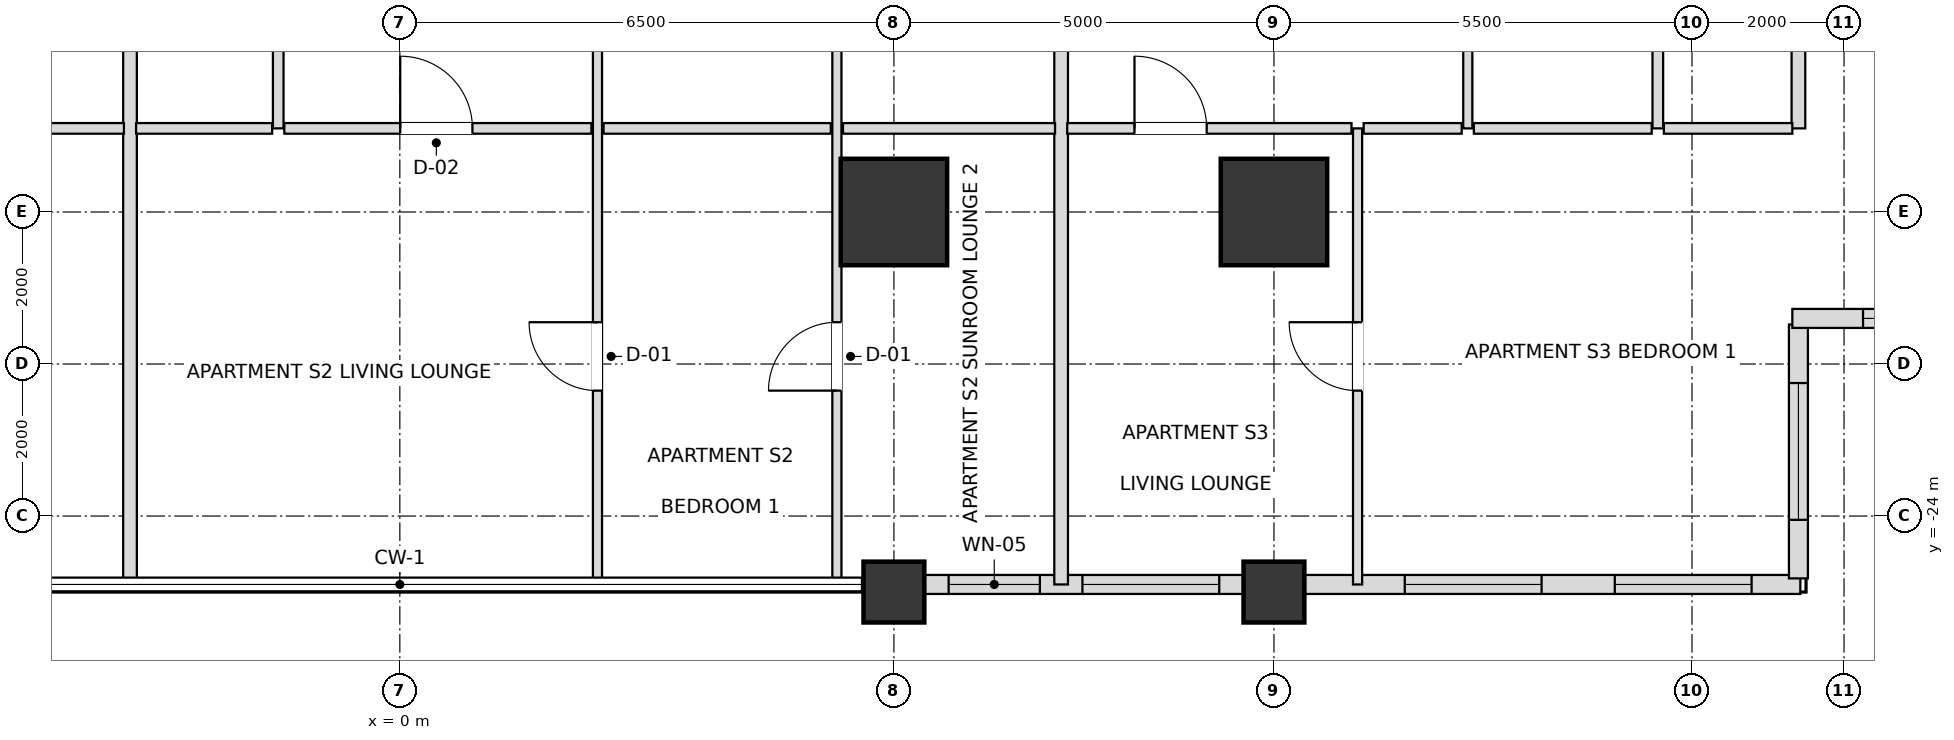
"""IFC4 building model, lengths in metres.
Left out: names, types, materials, properties, quantities, classifications, styles, units other than length and angle.
Written with IfcOpenShell. Run it as: python <this file> out.ifc"""

import sys

from ifc_helpers import new_model, si_unit, direction, frame, frame_2d, origin, origin_2d, place, context, subcontext, project, spatial, rectangle, extrude, element, fill, save


model = new_model("IFC4")
c1 = context("Model", 3, precision=1e-05, world=origin(), true_north=direction((0.0, 1.0)))
c2 = subcontext(c1, "Body", "Model", "MODEL_VIEW")
j1 = project(units=[si_unit("LENGTHUNIT", "METRE"), si_unit("PLANEANGLEUNIT", "RADIAN")], contexts=[c1])
p1 = place(None, origin())
s1 = spatial("IfcSite", under=j1, at=p1, CompositionType="ELEMENT")
p2 = place(p1, origin())
s2 = spatial("IfcBuilding", under=s1, at=p2, CompositionType="ELEMENT")
p3 = place(p2, frame((0.0, 0.0, 43.2)))
s3 = spatial("IfcBuildingStorey", under=s2, at=p3, CompositionType="ELEMENT", Elevation=43.2)
for number, where, z_axis, x_axis in (
    (1, (6.5, -20.0, 0.0), (0.0, 0.0, 1.0), (1.0, 0.0, 0.0)),
    (2, (11.5, -20.0, 0.0), (0.0, 0.0, 1.0), (1.0, 0.0, 0.0)),
):
    element("IfcColumn", number, at=place(p3, frame(where, z_axis=z_axis, x_axis=x_axis)), inside=s3, PredefinedType="USERDEFINED", context=c2, shape_type="SweptSolid", body=[
        extrude(rectangle(XDim=1.4, YDim=1.4, at=origin_2d()), origin(), (0.0, 0.0, 1.0), 3.6),
    ])
for number, where, z_axis, x_axis in (
    (3, (6.5, -25.0, 0.0), (0.0, 0.0, 1.0), (1.0, 0.0, 0.0)),
    (4, (11.5, -25.0, 0.0), (0.0, 0.0, 1.0), (1.0, 0.0, 0.0)),
):
    element("IfcColumn", number, at=place(p3, frame(where, z_axis=z_axis, x_axis=x_axis)), inside=s3, PredefinedType="COLUMN", context=c2, shape_type="SweptSolid", body=[
        extrude(rectangle(XDim=0.8, YDim=0.8, at=origin_2d()), origin(), (0.0, 0.0, 1.0), 3.6),
    ])
p4 = place(p3, frame((6.895, -24.9, 0.0), z_axis=(0.0, 0.0, 1.0), x_axis=(1.0, 0.0, 0.0)))
e5 = element("IfcWall", 5, at=p4, inside=s3, PredefinedType="SOLIDWALL", context=c2, shape_type="SweptSolid", body=[
    extrude(rectangle(XDim=4.21, YDim=0.25, at=frame_2d((2.105, 0.0))), origin(), (0.0, 0.0, 1.0), 2.736),
])
p5 = place(p4, frame((0.325, 0.0, 0.72)))
e6 = element("IfcOpeningElement", 6, at=p5, cuts=e5, PredefinedType="OPENING", context=c2, shape_type="SweptSolid", body=[
    extrude(rectangle(XDim=1.2, YDim=1.68, at=frame_2d((0.6, 0.84))), frame((0.0, 0.135, 0.0), z_axis=(0.0, -1.0, 0.0), x_axis=(1.0, 0.0, 0.0)), (0.0, 0.0, 1.0), 0.27),
])
p6 = place(p4, frame((2.085, 0.0, 0.72)))
e7 = element("IfcOpeningElement", 7, at=p6, cuts=e5, PredefinedType="OPENING", context=c2, shape_type="SweptSolid", body=[
    extrude(rectangle(XDim=1.8, YDim=1.68, at=frame_2d((0.9, 0.84))), frame((0.0, 0.135, 0.0), z_axis=(0.0, -1.0, 0.0), x_axis=(1.0, 0.0, 0.0)), (0.0, 0.0, 1.0), 0.27),
])
p7 = place(p3, frame((11.895, -24.9, 0.0), z_axis=(0.0, 0.0, 1.0), x_axis=(1.0, 0.0, 0.0)))
e8 = element("IfcWall", 8, at=p7, inside=s3, PredefinedType="SOLIDWALL", context=c2, shape_type="SweptSolid", body=[
    extrude(rectangle(XDim=6.53, YDim=0.25, at=frame_2d((3.265, 0.0))), origin(), (0.0, 0.0, 1.0), 2.736),
])
p8 = place(p7, frame((1.326, 0.0, 0.72)))
e9 = element("IfcOpeningElement", 9, at=p8, cuts=e8, PredefinedType="OPENING", context=c2, shape_type="SweptSolid", body=[
    extrude(rectangle(XDim=1.8, YDim=1.68, at=frame_2d((0.9, 0.84))), frame((0.0, 0.135, 0.0), z_axis=(0.0, -1.0, 0.0), x_axis=(1.0, 0.0, 0.0)), (0.0, 0.0, 1.0), 0.27),
])
p9 = place(p7, frame((4.089, 0.0, 0.72)))
e10 = element("IfcOpeningElement", 10, at=p9, cuts=e8, PredefinedType="OPENING", context=c2, shape_type="SweptSolid", body=[
    extrude(rectangle(XDim=1.8, YDim=1.68, at=frame_2d((0.9, 0.84))), frame((0.0, 0.135, 0.0), z_axis=(0.0, -1.0, 0.0), x_axis=(1.0, 0.0, 0.0)), (0.0, 0.0, 1.0), 0.27),
])
p10 = place(p3, frame((18.4, -24.82, 0.0), z_axis=(0.0, 0.0, 1.0), x_axis=(0.0, 1.0, 0.0)))
e11 = element("IfcWall", 11, at=p10, inside=s3, PredefinedType="SOLIDWALL", context=c2, shape_type="SweptSolid", body=[
    extrude(rectangle(XDim=3.34, YDim=0.25, at=frame_2d((1.67, 0.0))), origin(), (0.0, 0.0, 1.0), 2.736),
])
p11 = place(p10, frame((0.77, 0.0, 0.72)))
e12 = element("IfcOpeningElement", 12, at=p11, cuts=e11, PredefinedType="OPENING", context=c2, shape_type="SweptSolid", body=[
    extrude(rectangle(XDim=1.8, YDim=1.68, at=frame_2d((0.9, 0.84))), frame((0.0, 0.135, 0.0), z_axis=(0.0, -1.0, 0.0), x_axis=(1.0, 0.0, 0.0)), (0.0, 0.0, 1.0), 0.27),
])
p12 = place(p3, frame((18.32, -21.4, 0.0), z_axis=(0.0, 0.0, 1.0), x_axis=(1.0, 0.0, 0.0)))
e13 = element("IfcWall", 13, at=p12, inside=s3, PredefinedType="SOLIDWALL", context=c2, shape_type="SweptSolid", body=[
    extrude(rectangle(XDim=3.66, YDim=0.25, at=frame_2d((1.83, 0.0))), origin(), (0.0, 0.0, 1.0), 2.736),
])
p13 = place(p12, frame((0.93, 0.0, 0.72)))
e14 = element("IfcOpeningElement", 14, at=p13, cuts=e13, PredefinedType="OPENING", context=c2, shape_type="SweptSolid", body=[
    extrude(rectangle(XDim=1.8, YDim=1.68, at=frame_2d((0.9, 0.84))), frame((0.0, 0.135, 0.0), z_axis=(0.0, -1.0, 0.0), x_axis=(1.0, 0.0, 0.0)), (0.0, 0.0, 1.0), 0.27),
])
p14 = place(p3, frame((-3.55, -24.9, 0.0), z_axis=(0.0, 0.0, 1.0), x_axis=(0.0, 1.0, 0.0)))
e15 = element("IfcWall", 15, at=p14, inside=s3, PredefinedType="PARTITIONING", context=c2, shape_type="SweptSolid", body=[
    extrude(rectangle(XDim=15.6, YDim=0.18, at=frame_2d((7.8, 0.0))), origin(), (0.0, 0.0, 1.0), 2.816),
])
p15 = place(p3, frame((-1.6, -18.9, 0.0), z_axis=(0.0, 0.0, 1.0), x_axis=(0.0, 1.0, 0.0)))
e16 = element("IfcWall", 16, at=p15, inside=s3, PredefinedType="PARTITIONING", context=c2, shape_type="SweptSolid", body=[
    extrude(rectangle(XDim=9.6, YDim=0.14, at=frame_2d((4.8, 0.0))), origin(), (0.0, 0.0, 1.0), 2.948),
])
p16 = place(p15, frame((4.35, 0.0, 0.0)))
e17 = element("IfcOpeningElement", 17, at=p16, cuts=e16, PredefinedType="OPENING", context=c2, shape_type="SweptSolid", body=[
    extrude(rectangle(XDim=0.9, YDim=2.1, at=frame_2d((0.45, 1.05))), frame((0.0, 0.08, 0.0), z_axis=(0.0, -1.0, 0.0), x_axis=(1.0, 0.0, 0.0)), (0.0, 0.0, 1.0), 0.16),
])
p17 = place(p3, frame((2.6, -24.9, 0.0), z_axis=(0.0, 0.0, 1.0), x_axis=(0.0, 1.0, 0.0)))
e18 = element("IfcWall", 18, at=p17, inside=s3, PredefinedType="PARTITIONING", context=c2, shape_type="SweptSolid", body=[
    extrude(rectangle(XDim=15.6, YDim=0.12, at=frame_2d((7.8, 0.0))), origin(), (0.0, 0.0, 1.0), 2.816),
])
p18 = place(p17, frame((10.325, 0.0, 0.0)))
e19 = element("IfcOpeningElement", 19, at=p18, cuts=e18, PredefinedType="OPENING", context=c2, shape_type="SweptSolid", body=[
    extrude(rectangle(XDim=0.95, YDim=2.1, at=frame_2d((0.475, 1.05))), frame((0.0, 0.07, 0.0), z_axis=(0.0, -1.0, 0.0), x_axis=(1.0, 0.0, 0.0)), (0.0, 0.0, 1.0), 0.14),
])
p19 = place(p17, frame((2.55, 0.0, 0.0)))
e20 = element("IfcOpeningElement", 20, at=p19, cuts=e18, PredefinedType="OPENING", context=c2, shape_type="SweptSolid", body=[
    extrude(rectangle(XDim=0.9, YDim=2.1, at=frame_2d((0.45, 1.05))), frame((0.0, 0.07, 0.0), z_axis=(0.0, -1.0, 0.0), x_axis=(1.0, 0.0, 0.0)), (0.0, 0.0, 1.0), 0.14),
])
p20 = place(p3, frame((5.75, -24.9, 0.0), z_axis=(0.0, 0.0, 1.0), x_axis=(0.0, 1.0, 0.0)))
e21 = element("IfcWall", 21, at=p20, inside=s3, PredefinedType="PARTITIONING", context=c2, shape_type="SweptSolid", body=[
    extrude(rectangle(XDim=15.6, YDim=0.12, at=frame_2d((7.8, 0.0))), origin(), (0.0, 0.0, 1.0), 2.816),
])
p21 = place(p20, frame((10.35, 0.0, 0.0)))
e22 = element("IfcOpeningElement", 22, at=p21, cuts=e21, PredefinedType="OPENING", context=c2, shape_type="SweptSolid", body=[
    extrude(rectangle(XDim=0.9, YDim=2.1, at=frame_2d((0.45, 1.05))), frame((0.0, 0.07, 0.0), z_axis=(0.0, -1.0, 0.0), x_axis=(1.0, 0.0, 0.0)), (0.0, 0.0, 1.0), 0.14),
])
p22 = place(p20, frame((2.55, 0.0, 0.0)))
e23 = element("IfcOpeningElement", 23, at=p22, cuts=e21, PredefinedType="OPENING", context=c2, shape_type="SweptSolid", body=[
    extrude(rectangle(XDim=0.9, YDim=2.1, at=frame_2d((0.45, 1.05))), frame((0.0, 0.07, 0.0), z_axis=(0.0, -1.0, 0.0), x_axis=(1.0, 0.0, 0.0)), (0.0, 0.0, 1.0), 0.14),
])
p23 = place(p3, frame((8.7, -24.9, 0.0), z_axis=(0.0, 0.0, 1.0), x_axis=(0.0, 1.0, 0.0)))
e24 = element("IfcWall", 24, at=p23, inside=s3, PredefinedType="PARTITIONING", context=c2, shape_type="SweptSolid", body=[
    extrude(rectangle(XDim=15.6, YDim=0.18, at=frame_2d((7.8, 0.0))), origin(), (0.0, 0.0, 1.0), 2.816),
])
p24 = place(p3, frame((12.6, -24.9, 0.0), z_axis=(0.0, 0.0, 1.0), x_axis=(0.0, 1.0, 0.0)))
e25 = element("IfcWall", 25, at=p24, inside=s3, PredefinedType="PARTITIONING", context=c2, shape_type="SweptSolid", body=[
    extrude(rectangle(XDim=6.0, YDim=0.12, at=frame_2d((3.0, 0.0))), origin(), (0.0, 0.0, 1.0), 2.736),
])
p25 = place(p24, frame((2.55, 0.0, 0.0)))
e26 = element("IfcOpeningElement", 26, at=p25, cuts=e25, PredefinedType="OPENING", context=c2, shape_type="SweptSolid", body=[
    extrude(rectangle(XDim=0.9, YDim=2.1, at=frame_2d((0.45, 1.05))), frame((0.0, 0.07, 0.0), z_axis=(0.0, -1.0, 0.0), x_axis=(1.0, 0.0, 0.0)), (0.0, 0.0, 1.0), 0.14),
])
p26 = place(p3, frame((14.05, -18.9, 0.0), z_axis=(0.0, 0.0, 1.0), x_axis=(0.0, 1.0, 0.0)))
e27 = element("IfcWall", 27, at=p26, inside=s3, PredefinedType="PARTITIONING", context=c2, shape_type="SweptSolid", body=[
    extrude(rectangle(XDim=9.6, YDim=0.12, at=frame_2d((4.8, 0.0))), origin(), (0.0, 0.0, 1.0), 2.736),
])
p27 = place(p26, frame((4.325, 0.0, 0.0)))
e28 = element("IfcOpeningElement", 28, at=p27, cuts=e27, PredefinedType="OPENING", context=c2, shape_type="SweptSolid", body=[
    extrude(rectangle(XDim=0.95, YDim=2.1, at=frame_2d((0.475, 1.05))), frame((0.0, 0.07, 0.0), z_axis=(0.0, -1.0, 0.0), x_axis=(1.0, 0.0, 0.0)), (0.0, 0.0, 1.0), 0.14),
])
p28 = place(p3, frame((16.55, -18.9, 0.0), z_axis=(0.0, 0.0, 1.0), x_axis=(0.0, 1.0, 0.0)))
e29 = element("IfcWall", 29, at=p28, inside=s3, PredefinedType="PARTITIONING", context=c2, shape_type="SweptSolid", body=[
    extrude(rectangle(XDim=9.6, YDim=0.14, at=frame_2d((4.8, 0.0))), origin(), (0.0, 0.0, 1.0), 2.736),
])
p29 = place(p28, frame((4.222, 0.0, 0.0)))
e30 = element("IfcOpeningElement", 30, at=p29, cuts=e29, PredefinedType="OPENING", context=c2, shape_type="SweptSolid", body=[
    extrude(rectangle(XDim=0.9, YDim=2.1, at=frame_2d((0.45, 1.05))), frame((0.0, 0.08, 0.0), z_axis=(0.0, -1.0, 0.0), x_axis=(1.0, 0.0, 0.0)), (0.0, 0.0, 1.0), 0.16),
])
p30 = place(p3, frame((18.4, -18.9, 0.0), z_axis=(0.0, 0.0, 1.0), x_axis=(0.0, 1.0, 0.0)))
e31 = element("IfcWall", 31, at=p30, inside=s3, PredefinedType="PARTITIONING", context=c2, shape_type="SweptSolid", body=[
    extrude(rectangle(XDim=9.6, YDim=0.18, at=frame_2d((4.8, 0.0))), origin(), (0.0, 0.0, 1.0), 2.736),
])
p31 = place(p3, frame((-7.67, -18.9, 0.0), z_axis=(0.0, 0.0, 1.0), x_axis=(1.0, 0.0, 0.0)))
e32 = element("IfcWall", 32, at=p31, inside=s3, PredefinedType="PARTITIONING", context=c2, shape_type="SweptSolid", body=[
    extrude(rectangle(XDim=4.04, YDim=0.14, at=frame_2d((2.02, 0.0))), origin(), (0.0, 0.0, 1.0), 2.816),
])
p32 = place(p31, frame((1.934, 0.0, 0.0)))
e33 = element("IfcOpeningElement", 33, at=p32, cuts=e32, PredefinedType="OPENING", context=c2, shape_type="SweptSolid", body=[
    extrude(rectangle(XDim=0.95, YDim=2.1, at=frame_2d((0.475, 1.05))), frame((0.0, 0.08, 0.0), z_axis=(0.0, -1.0, 0.0), x_axis=(1.0, 0.0, 0.0)), (0.0, 0.0, 1.0), 0.16),
])
p33 = place(p3, frame((-3.47, -18.9, 0.0), z_axis=(0.0, 0.0, 1.0), x_axis=(1.0, 0.0, 0.0)))
e34 = element("IfcWall", 34, at=p33, inside=s3, PredefinedType="PARTITIONING", context=c2, shape_type="SweptSolid", body=[
    extrude(rectangle(XDim=1.79, YDim=0.14, at=frame_2d((0.895, 0.0))), origin(), (0.0, 0.0, 1.0), 3.38),
])
p34 = place(p3, frame((-1.52, -18.9, 0.0), z_axis=(0.0, 0.0, 1.0), x_axis=(1.0, 0.0, 0.0)))
e35 = element("IfcWall", 35, at=p34, inside=s3, PredefinedType="PARTITIONING", context=c2, shape_type="SweptSolid", body=[
    extrude(rectangle(XDim=4.04, YDim=0.14, at=frame_2d((2.02, 0.0))), origin(), (0.0, 0.0, 1.0), 3.38),
])
p35 = place(p34, frame((1.525, 0.0, 0.0)))
e36 = element("IfcOpeningElement", 36, at=p35, cuts=e35, PredefinedType="OPENING", context=c2, shape_type="SweptSolid", body=[
    extrude(rectangle(XDim=0.95, YDim=2.1, at=frame_2d((0.475, 1.05))), frame((0.0, 0.08, 0.0), z_axis=(0.0, -1.0, 0.0), x_axis=(1.0, 0.0, 0.0)), (0.0, 0.0, 1.0), 0.16),
])
p36 = place(p3, frame((2.68, -18.9, 0.0), z_axis=(0.0, 0.0, 1.0), x_axis=(1.0, 0.0, 0.0)))
e37 = element("IfcWall", 37, at=p36, inside=s3, PredefinedType="PARTITIONING", context=c2, shape_type="SweptSolid", body=[
    extrude(rectangle(XDim=2.99, YDim=0.14, at=frame_2d((1.495, 0.0))), origin(), (0.0, 0.0, 1.0), 3.38),
])
p37 = place(p3, frame((5.83, -18.9, 0.0), z_axis=(0.0, 0.0, 1.0), x_axis=(1.0, 0.0, 0.0)))
e38 = element("IfcWall", 38, at=p37, inside=s3, PredefinedType="PARTITIONING", context=c2, shape_type="SweptSolid", body=[
    extrude(rectangle(XDim=2.79, YDim=0.14, at=frame_2d((1.395, 0.0))), origin(), (0.0, 0.0, 1.0), 2.816),
])
p38 = place(p3, frame((8.78, -18.9, 0.0), z_axis=(0.0, 0.0, 1.0), x_axis=(1.0, 0.0, 0.0)))
e39 = element("IfcWall", 39, at=p38, inside=s3, PredefinedType="PARTITIONING", context=c2, shape_type="SweptSolid", body=[
    extrude(rectangle(XDim=3.74, YDim=0.14, at=frame_2d((1.87, 0.0))), origin(), (0.0, 0.0, 1.0), 2.736),
])
p39 = place(p38, frame((0.885, 0.0, 0.0)))
e40 = element("IfcOpeningElement", 40, at=p39, cuts=e39, PredefinedType="OPENING", context=c2, shape_type="SweptSolid", body=[
    extrude(rectangle(XDim=0.95, YDim=2.1, at=frame_2d((0.475, 1.05))), frame((0.0, 0.08, 0.0), z_axis=(0.0, -1.0, 0.0), x_axis=(1.0, 0.0, 0.0)), (0.0, 0.0, 1.0), 0.16),
])
p40 = place(p3, frame((12.68, -18.9, 0.0), z_axis=(0.0, 0.0, 1.0), x_axis=(1.0, 0.0, 0.0)))
e41 = element("IfcWall", 41, at=p40, inside=s3, PredefinedType="PARTITIONING", context=c2, shape_type="SweptSolid", body=[
    extrude(rectangle(XDim=1.29, YDim=0.14, at=frame_2d((0.645, 0.0))), origin(), (0.0, 0.0, 1.0), 2.736),
])
p41 = place(p3, frame((14.13, -18.9, 0.0), z_axis=(0.0, 0.0, 1.0), x_axis=(1.0, 0.0, 0.0)))
e42 = element("IfcWall", 42, at=p41, inside=s3, PredefinedType="PARTITIONING", context=c2, shape_type="SweptSolid", body=[
    extrude(rectangle(XDim=2.34, YDim=0.14, at=frame_2d((1.17, 0.0))), origin(), (0.0, 0.0, 1.0), 2.736),
])
p42 = place(p3, frame((16.63, -18.9, 0.0), z_axis=(0.0, 0.0, 1.0), x_axis=(1.0, 0.0, 0.0)))
e43 = element("IfcWall", 43, at=p42, inside=s3, PredefinedType="PARTITIONING", context=c2, shape_type="SweptSolid", body=[
    extrude(rectangle(XDim=1.69, YDim=0.14, at=frame_2d((0.845, 0.0))), origin(), (0.0, 0.0, 1.0), 2.736),
])
p43 = place(p5, origin())
e44 = element("IfcWindow", 44, at=p43, inside=s3, PartitioningType="SINGLE_PANEL", PredefinedType="WINDOW", context=c2, shape_type="SweptSolid", body=[
    extrude(rectangle(XDim=1.2, YDim=1.68, at=frame_2d((0.6, 0.84))), frame((0.0, 0.03, 0.0), z_axis=(0.0, -1.0, 0.0), x_axis=(1.0, 0.0, 0.0)), (0.0, 0.0, 1.0), 0.06),
])
fill(e6, e44)
p44 = place(p6, origin())
e45 = element("IfcWindow", 45, at=p44, inside=s3, PartitioningType="SINGLE_PANEL", PredefinedType="WINDOW", context=c2, shape_type="SweptSolid", body=[
    extrude(rectangle(XDim=1.8, YDim=1.68, at=frame_2d((0.9, 0.84))), frame((0.0, 0.03, 0.0), z_axis=(0.0, -1.0, 0.0), x_axis=(1.0, 0.0, 0.0)), (0.0, 0.0, 1.0), 0.06),
])
fill(e7, e45)
p45 = place(p8, origin())
e46 = element("IfcWindow", 46, at=p45, inside=s3, PartitioningType="SINGLE_PANEL", PredefinedType="WINDOW", context=c2, shape_type="SweptSolid", body=[
    extrude(rectangle(XDim=1.8, YDim=1.68, at=frame_2d((0.9, 0.84))), frame((0.0, 0.03, 0.0), z_axis=(0.0, -1.0, 0.0), x_axis=(1.0, 0.0, 0.0)), (0.0, 0.0, 1.0), 0.06),
])
fill(e9, e46)
p46 = place(p9, origin())
e47 = element("IfcWindow", 47, at=p46, inside=s3, PartitioningType="SINGLE_PANEL", PredefinedType="WINDOW", context=c2, shape_type="SweptSolid", body=[
    extrude(rectangle(XDim=1.8, YDim=1.68, at=frame_2d((0.9, 0.84))), frame((0.0, 0.03, 0.0), z_axis=(0.0, -1.0, 0.0), x_axis=(1.0, 0.0, 0.0)), (0.0, 0.0, 1.0), 0.06),
])
fill(e10, e47)
p47 = place(p11, origin())
e48 = element("IfcWindow", 48, at=p47, inside=s3, PartitioningType="SINGLE_PANEL", PredefinedType="WINDOW", context=c2, shape_type="SweptSolid", body=[
    extrude(rectangle(XDim=1.8, YDim=1.68, at=frame_2d((0.9, 0.84))), frame((0.0, 0.03, 0.0), z_axis=(0.0, -1.0, 0.0), x_axis=(1.0, 0.0, 0.0)), (0.0, 0.0, 1.0), 0.06),
])
fill(e12, e48)
p48 = place(p13, origin())
e49 = element("IfcWindow", 49, at=p48, inside=s3, PartitioningType="SINGLE_PANEL", PredefinedType="WINDOW", context=c2, shape_type="SweptSolid", body=[
    extrude(rectangle(XDim=1.8, YDim=1.68, at=frame_2d((0.9, 0.84))), frame((0.0, 0.03, 0.0), z_axis=(0.0, -1.0, 0.0), x_axis=(1.0, 0.0, 0.0)), (0.0, 0.0, 1.0), 0.06),
])
fill(e14, e49)
p49 = place(p35, origin())
e50 = element("IfcDoor", 50, at=p49, inside=s3, OperationType="SINGLE_SWING_LEFT", PredefinedType="DOOR", context=c2, shape_type="SweptSolid", body=[
    extrude(rectangle(XDim=0.95, YDim=2.1, at=frame_2d((0.475, 1.05))), frame((0.0, 0.025, 0.0), z_axis=(0.0, -1.0, 0.0), x_axis=(1.0, 0.0, 0.0)), (0.0, 0.0, 1.0), 0.05),
])
fill(e36, e50)
p50 = place(p19, origin())
e51 = element("IfcDoor", 51, at=p50, inside=s3, OperationType="SINGLE_SWING_RIGHT", PredefinedType="DOOR", context=c2, shape_type="SweptSolid", body=[
    extrude(rectangle(XDim=0.9, YDim=2.1, at=frame_2d((0.45, 1.05))), frame((0.0, 0.025, 0.0), z_axis=(0.0, -1.0, 0.0), x_axis=(1.0, 0.0, 0.0)), (0.0, 0.0, 1.0), 0.05),
])
fill(e20, e51)
p51 = place(p22, origin())
e52 = element("IfcDoor", 52, at=p51, inside=s3, OperationType="SINGLE_SWING_LEFT", PredefinedType="DOOR", context=c2, shape_type="SweptSolid", body=[
    extrude(rectangle(XDim=0.9, YDim=2.1, at=frame_2d((0.45, 1.05))), frame((0.0, 0.025, 0.0), z_axis=(0.0, -1.0, 0.0), x_axis=(1.0, 0.0, 0.0)), (0.0, 0.0, 1.0), 0.05),
])
fill(e23, e52)
p52 = place(p39, origin())
e53 = element("IfcDoor", 53, at=p52, inside=s3, OperationType="SINGLE_SWING_LEFT", PredefinedType="DOOR", context=c2, shape_type="SweptSolid", body=[
    extrude(rectangle(XDim=0.95, YDim=2.1, at=frame_2d((0.475, 1.05))), frame((0.0, 0.025, 0.0), z_axis=(0.0, -1.0, 0.0), x_axis=(1.0, 0.0, 0.0)), (0.0, 0.0, 1.0), 0.05),
])
fill(e40, e53)
p53 = place(p25, origin())
e54 = element("IfcDoor", 54, at=p53, inside=s3, OperationType="SINGLE_SWING_RIGHT", PredefinedType="DOOR", context=c2, shape_type="SweptSolid", body=[
    extrude(rectangle(XDim=0.9, YDim=2.1, at=frame_2d((0.45, 1.05))), frame((0.0, 0.025, 0.0), z_axis=(0.0, -1.0, 0.0), x_axis=(1.0, 0.0, 0.0)), (0.0, 0.0, 1.0), 0.05),
])
fill(e26, e54)
save(model, sys.argv[1])
